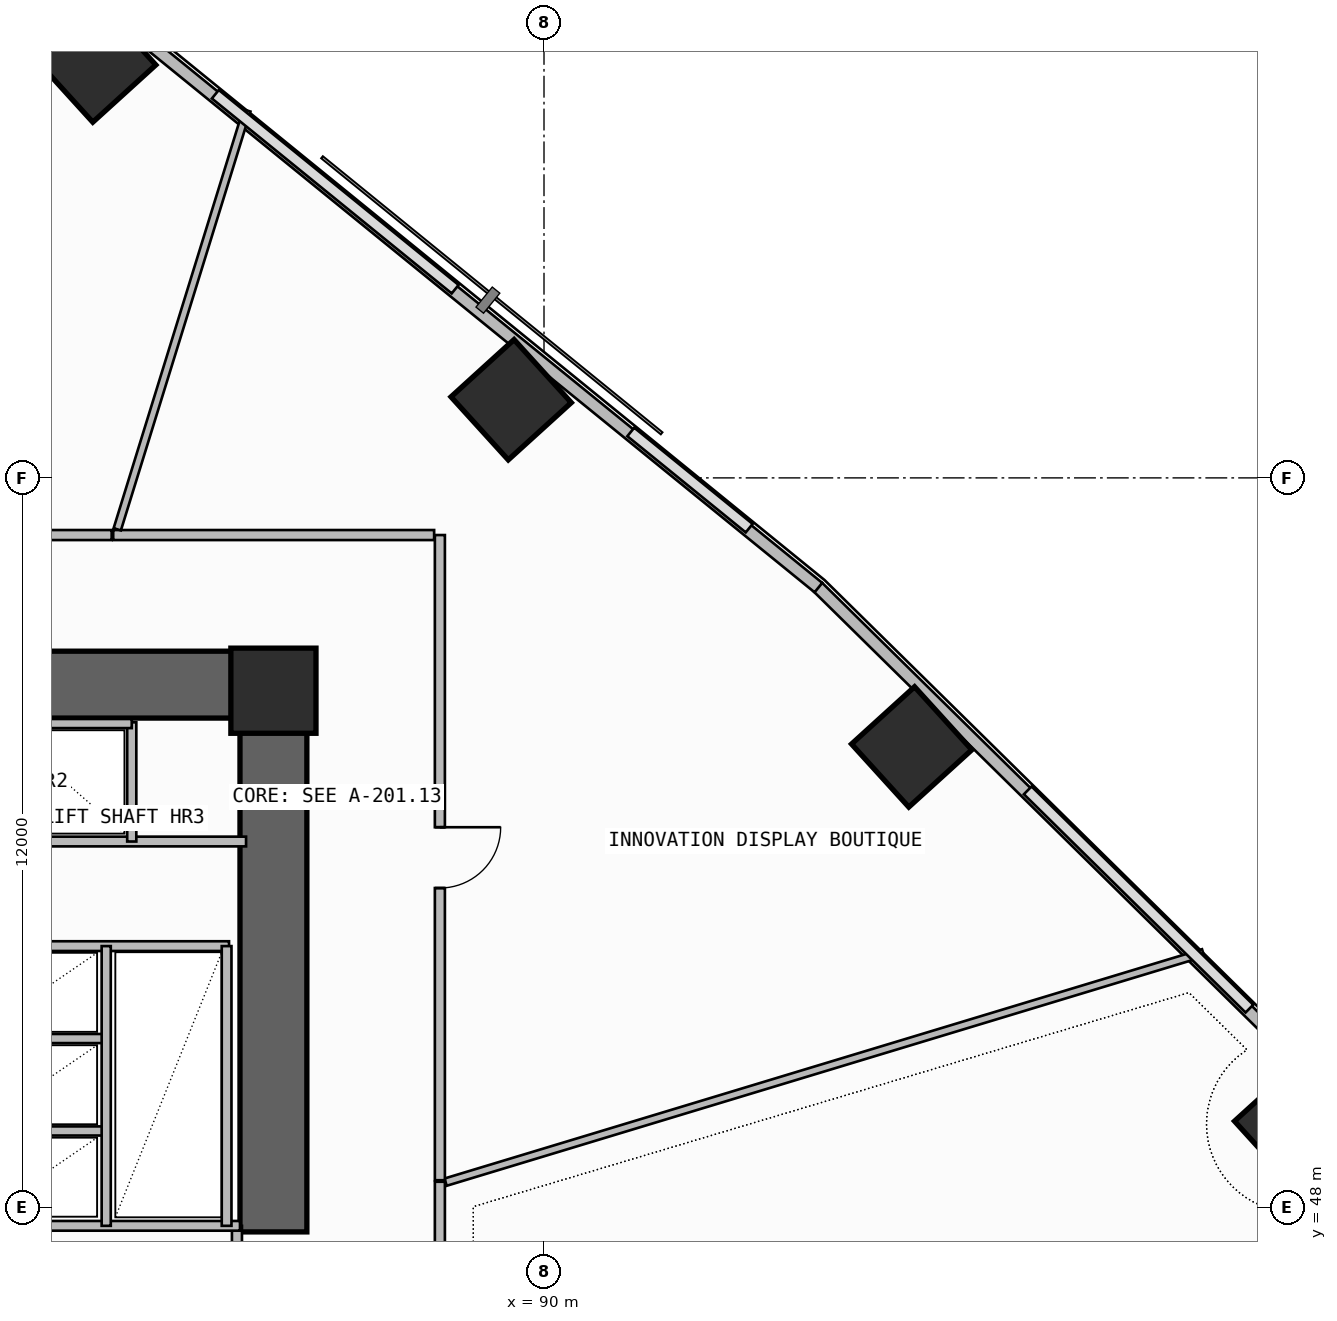
"""IFC4 building model, lengths in metres.
Left out: names, types, materials, properties, quantities, classifications, styles, units other than length and angle.
Written with IfcOpenShell. Run it as: python <this file> out.ifc"""

import sys

from ifc_helpers import new_model, si_unit, direction, frame, frame_2d, origin, origin_2d, place, context, subcontext, project, spatial, rectangle, extrude, element, fill, save


model = new_model("IFC4")
c1 = context("Model", 3, precision=1e-05, world=origin(), true_north=direction((0.0, 1.0)))
c2 = subcontext(c1, "Body", "Model", "MODEL_VIEW")
j1 = project(units=[si_unit("LENGTHUNIT", "METRE"), si_unit("PLANEANGLEUNIT", "RADIAN")], contexts=[c1])
p1 = place(None, origin())
s1 = spatial("IfcSite", under=j1, at=p1, CompositionType="ELEMENT")
p2 = place(p1, origin())
s2 = spatial("IfcBuilding", under=s1, at=p2, CompositionType="ELEMENT")
p3 = place(p2, frame((0.0, 0.0, 44.7)))
s3 = spatial("IfcBuildingStorey", under=s2, at=p3, CompositionType="ELEMENT", Elevation=44.7)
p4 = place(p3, frame((71.8, 56.6, -0.2), z_axis=(0.0, 0.0, 1.0), x_axis=(1.0, 0.0, 0.0)))
e1 = element("IfcWall", 1, at=p4, inside=s3, PredefinedType="SHEAR", context=c2, shape_type="SweptSolid", body=[
    extrude(rectangle(XDim=14.3, YDim=1.1, at=frame_2d((7.15, 0.0))), origin(), (0.0, 0.0, 1.0), 3.54),
])
p5 = place(p3, frame((85.55, 47.6, -0.2), z_axis=(0.0, 0.0, 1.0), x_axis=(0.0, 1.0, 0.0)))
e2 = element("IfcWall", 2, at=p5, inside=s3, PredefinedType="SHEAR", context=c2, shape_type="SweptSolid", body=[
    extrude(rectangle(XDim=8.45, YDim=1.1, at=frame_2d((4.225, 0.0))), origin(), (0.0, 0.0, 1.0), 3.54),
])
for number, where, z_axis, x_axis in (
    (3, (85.55, 56.5, 0.0), (0.0, 0.0, 1.0), (1.0, 0.0, 0.0)),
    (4, (102.345, 49.374, 0.0), (0.0, 0.0, 1.0), (0.74, 0.672, 0.0)),
    (5, (96.047, 55.576, 0.0), (0.0, 0.0, 1.0), (0.74, 0.672, 0.0)),
    (6, (89.46, 61.285, 0.0), (0.0, 0.0, 1.0), (0.74, 0.672, 0.0)),
    (7, (82.627, 66.839, 0.0), (0.0, 0.0, 1.0), (0.74, 0.672, 0.0)),
):
    element("IfcColumn", number, at=place(p3, frame(where, z_axis=z_axis, x_axis=x_axis)), inside=s3, PredefinedType="COLUMN", context=c2, shape_type="SweptSolid", body=[
        extrude(rectangle(XDim=1.4, YDim=1.4, at=origin_2d()), origin(), (0.0, 0.0, 1.0), 3.6),
    ])
p6 = place(p3, frame((120.254, 32.848, 0.0), z_axis=(0.0, 0.0, 1.0), x_axis=(-0.71254385441, 0.701627576099, 0.0)))
e8 = element("IfcWall", 8, at=p6, inside=s3, PredefinedType="PARAPET", context=c2, shape_type="SweptSolid", body=[
    extrude(rectangle(XDim=36.142, YDim=0.2, at=frame_2d((18.071, 0.0))), origin(), (0.0, 0.0, 1.0), 1.15),
])
p7 = place(p3, frame((94.513, 58.196, 0.0), z_axis=(0.0, 0.0, 1.0), x_axis=(-0.776001602097, 0.630730935933, 0.0)))
e9 = element("IfcWall", 9, at=p7, inside=s3, PredefinedType="PARAPET", context=c2, shape_type="SweptSolid", body=[
    extrude(rectangle(XDim=36.148, YDim=0.2, at=frame_2d((18.074, 0.0))), origin(), (0.0, 0.0, 1.0), 1.15),
])
p8 = place(p3, frame((84.95, 45.58, 0.0), z_axis=(0.0, 0.0, 1.0), x_axis=(0.0, 1.0, 0.0)))
e10 = element("IfcWall", 10, at=p8, inside=s3, PredefinedType="PARTITIONING", context=c2, shape_type="SweptSolid", body=[
    extrude(rectangle(XDim=2.12, YDim=0.165, at=frame_2d((1.06, 0.0))), origin(), (0.0, 0.0, 1.0), 3.34),
])
p9 = place(p8, frame((0.56, 0.0, 0.0)))
e11 = element("IfcOpeningElement", 11, at=p9, cuts=e10, PredefinedType="OPENING", context=c2, shape_type="SweptSolid", body=[
    extrude(rectangle(XDim=1.0, YDim=2.2, at=frame_2d((0.5, 1.1))), frame((0.0, 0.093, 0.0), z_axis=(0.0, -1.0, 0.0), x_axis=(1.0, 0.0, 0.0)), (0.0, 0.0, 1.0), 0.185),
])
p10 = place(p3, frame((80.6, 47.7, 0.0), z_axis=(0.0, 0.0, 1.0), x_axis=(1.0, 0.0, 0.0)))
e12 = element("IfcWall", 12, at=p10, inside=s3, PredefinedType="SOLIDWALL", context=c2, shape_type="SweptSolid", body=[
    extrude(rectangle(XDim=4.4, YDim=0.16, at=frame_2d((2.2, 0.0))), origin(), (0.0, 0.0, 1.0), 3.34),
])
p11 = place(p3, frame((80.6, 52.3, 0.0), z_axis=(0.0, 0.0, 1.0), x_axis=(1.0, 0.0, 0.0)))
e13 = element("IfcWall", 13, at=p11, inside=s3, PredefinedType="SOLIDWALL", context=c2, shape_type="SweptSolid", body=[
    extrude(rectangle(XDim=4.22, YDim=0.16, at=frame_2d((2.11, 0.0))), origin(), (0.0, 0.0, 1.0), 3.34),
])
for number, where, z_axis, x_axis in (
    (14, (80.6, 49.26, 0.0), (0.0, 0.0, 1.0), (1.0, 0.0, 0.0)),
    (15, (80.6, 50.78, 0.0), (0.0, 0.0, 1.0), (1.0, 0.0, 0.0)),
):
    element("IfcWall", number, at=place(p3, frame(where, z_axis=z_axis, x_axis=x_axis)), inside=s3, PredefinedType="PLUMBINGWALL", context=c2, shape_type="SweptSolid", body=[
        extrude(rectangle(XDim=2.2, YDim=0.15, at=frame_2d((1.1, 0.0))), origin(), (0.0, 0.0, 1.0), 3.34),
    ])
p12 = place(p3, frame((82.8, 47.7, 0.0), z_axis=(0.0, 0.0, 1.0), x_axis=(0.0, 1.0, 0.0)))
e16 = element("IfcWall", 16, at=p12, inside=s3, PredefinedType="PLUMBINGWALL", context=c2, shape_type="SweptSolid", body=[
    extrude(rectangle(XDim=4.6, YDim=0.15, at=frame_2d((2.3, 0.0))), origin(), (0.0, 0.0, 1.0), 3.34),
])
p13 = place(p3, frame((84.78, 47.7, 0.0), z_axis=(0.0, 0.0, 1.0), x_axis=(0.0, 1.0, 0.0)))
e17 = element("IfcWall", 17, at=p13, inside=s3, PredefinedType="SOLIDWALL", context=c2, shape_type="SweptSolid", body=[
    extrude(rectangle(XDim=4.6, YDim=0.16, at=frame_2d((2.3, 0.0))), origin(), (0.0, 0.0, 1.0), 3.34),
])
p14 = place(p3, frame((73.02, 54.02, 0.0), z_axis=(0.0, 0.0, 1.0), x_axis=(1.0, 0.0, 0.0)))
e18 = element("IfcWall", 18, at=p14, inside=s3, PredefinedType="SOLIDWALL", context=c2, shape_type="SweptSolid", body=[
    extrude(rectangle(XDim=12.08, YDim=0.16, at=frame_2d((6.04, 0.0))), origin(), (0.0, 0.0, 1.0), 3.34),
])
p15 = place(p3, frame((83.22, 54.02, 0.0), z_axis=(0.0, 0.0, 1.0), x_axis=(0.0, 1.0, 0.0)))
e19 = element("IfcWall", 19, at=p15, inside=s3, PredefinedType="SOLIDWALL", context=c2, shape_type="SweptSolid", body=[
    extrude(rectangle(XDim=1.96, YDim=0.15, at=frame_2d((0.98, 0.0))), origin(), (0.0, 0.0, 1.0), 3.34),
])
p16 = place(p3, frame((76.52, 55.96, 0.0), z_axis=(0.0, 0.0, 1.0), x_axis=(1.0, 0.0, 0.0)))
e20 = element("IfcWall", 20, at=p16, inside=s3, PredefinedType="SOLIDWALL", context=c2, shape_type="SweptSolid", body=[
    extrude(rectangle(XDim=6.7, YDim=0.15, at=frame_2d((3.35, 0.0))), origin(), (0.0, 0.0, 1.0), 3.34),
])
p17 = place(p3, frame((88.288, 41.28, 0.0), z_axis=(0.0, 0.0, 1.0), x_axis=(0.0, 1.0, 0.0)))
e21 = element("IfcWall", 21, at=p17, inside=s3, PredefinedType="PARTITIONING", context=c2, shape_type="SweptSolid", body=[
    extrude(rectangle(XDim=7.145, YDim=0.165, at=frame_2d((3.573, 0.0))), origin(), (0.0, 0.0, 1.0), 2.725),
])
p18 = place(p17, frame((3.073, 0.0, 0.0)))
e22 = element("IfcOpeningElement", 22, at=p18, cuts=e21, PredefinedType="OPENING", context=c2, shape_type="SweptSolid", body=[
    extrude(rectangle(XDim=1.0, YDim=2.2, at=frame_2d((0.5, 1.1))), frame((0.0, 0.093, 0.0), z_axis=(0.0, -1.0, 0.0), x_axis=(1.0, 0.0, 0.0)), (0.0, 0.0, 1.0), 0.185),
])
p19 = place(p3, frame((88.382, 48.418, 0.0), z_axis=(0.0, 0.0, 1.0), x_axis=(0.957118216814, 0.289697633823, 0.0)))
e23 = element("IfcWall", 23, at=p19, inside=s3, PredefinedType="PARTITIONING", context=c2, shape_type="SweptSolid", body=[
    extrude(rectangle(XDim=13.016, YDim=0.125, at=frame_2d((6.508, 0.0))), origin(), (0.0, 0.0, 1.0), 2.725),
])
p20 = place(p3, frame((88.288, 48.45, 0.0), z_axis=(0.0, 0.0, 1.0), x_axis=(0.0, 1.0, 0.0)))
e24 = element("IfcWall", 24, at=p20, inside=s3, PredefinedType="PARTITIONING", context=c2, shape_type="SweptSolid", body=[
    extrude(rectangle(XDim=10.61, YDim=0.165, at=frame_2d((5.305, 0.0))), origin(), (0.0, 0.0, 1.0), 2.725),
])
p21 = place(p20, frame((4.805, 0.0, 0.0)))
e25 = element("IfcOpeningElement", 25, at=p21, cuts=e24, PredefinedType="OPENING", context=c2, shape_type="SweptSolid", body=[
    extrude(rectangle(XDim=1.0, YDim=2.2, at=frame_2d((0.5, 1.1))), frame((0.0, 0.093, 0.0), z_axis=(0.0, -1.0, 0.0), x_axis=(1.0, 0.0, 0.0)), (0.0, 0.0, 1.0), 0.185),
])
p22 = place(p3, frame((88.193, 59.06, 0.0), z_axis=(0.0, 0.0, 1.0), x_axis=(-1.0, 0.0, 0.0)))
e26 = element("IfcWall", 26, at=p22, inside=s3, PredefinedType="PARTITIONING", context=c2, shape_type="SweptSolid", body=[
    extrude(rectangle(XDim=5.278, YDim=0.165, at=frame_2d((2.639, 0.0))), origin(), (0.0, 0.0, 1.0), 2.725),
])
p23 = place(p3, frame((82.982, 59.155, 0.0), z_axis=(0.0, 0.0, 1.0), x_axis=(0.295491705725, 0.955345305033, 0.0)))
e27 = element("IfcWall", 27, at=p23, inside=s3, PredefinedType="PARTITIONING", context=c2, shape_type="SweptSolid", body=[
    extrude(rectangle(XDim=7.21, YDim=0.125, at=frame_2d((3.605, 0.0))), origin(), (0.0, 0.0, 1.0), 2.725),
])
p24 = place(p3, frame((82.89, 59.06, 0.0), z_axis=(0.0, 0.0, 1.0), x_axis=(-1.0, 0.0, 0.0)))
e28 = element("IfcWall", 28, at=p24, inside=s3, PredefinedType="PARTITIONING", context=c2, shape_type="SweptSolid", body=[
    extrude(rectangle(XDim=9.096, YDim=0.165, at=frame_2d((4.548, 0.0))), origin(), (0.0, 0.0, 1.0), 3.34),
])
p25 = place(p24, frame((4.048, 0.0, 0.0)))
e29 = element("IfcOpeningElement", 29, at=p25, cuts=e28, PredefinedType="OPENING", context=c2, shape_type="SweptSolid", body=[
    extrude(rectangle(XDim=1.0, YDim=2.2, at=frame_2d((0.5, 1.1))), frame((0.0, 0.093, 0.0), z_axis=(0.0, -1.0, 0.0), x_axis=(1.0, 0.0, 0.0)), (0.0, 0.0, 1.0), 0.185),
])
p26 = place(p21, frame((1.0, 0.0, 0.0), z_axis=(0.0, 0.0, 1.0), x_axis=(-1.0, 0.0, 0.0)))
e30 = element("IfcDoor", 30, at=p26, inside=s3, OperationType="SINGLE_SWING_LEFT", PredefinedType="DOOR", context=c2, shape_type="SweptSolid", body=[
    extrude(rectangle(XDim=1.0, YDim=2.2, at=frame_2d((0.5, 1.1))), frame((0.0, 0.025, 0.0), z_axis=(0.0, -1.0, 0.0), x_axis=(1.0, 0.0, 0.0)), (0.0, 0.0, 1.0), 0.05),
])
fill(e25, e30)
save(model, sys.argv[1])
